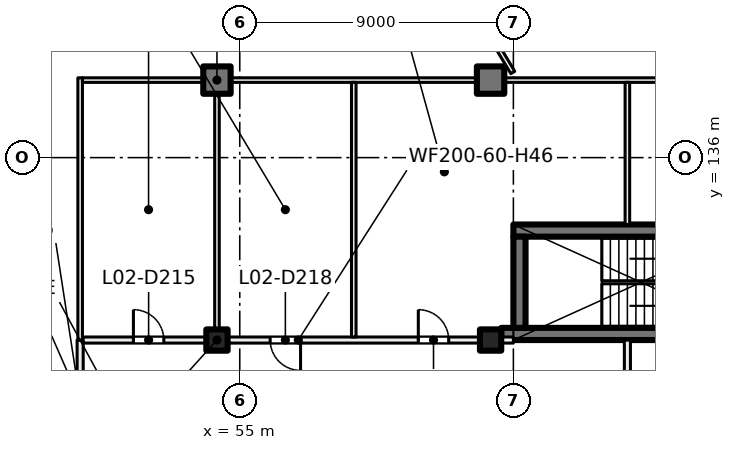
"""IFC4 building model, lengths in metres.
Left out: names, types, materials, properties, quantities, classifications, styles, units other than length and angle.
Written with IfcOpenShell. Run it as: python <this file> out.ifc"""

import sys

from ifc_helpers import new_model, si_unit, direction, frame, frame_2d, origin, origin_2d, place, context, subcontext, project, spatial, rectangle, extrude, element, fill, save


model = new_model("IFC4")
c1 = context("Model", 3, precision=1e-05, world=origin(), true_north=direction((0.0, 1.0)))
c2 = subcontext(c1, "Body", "Model", "MODEL_VIEW")
j1 = project(units=[si_unit("LENGTHUNIT", "METRE"), si_unit("PLANEANGLEUNIT", "RADIAN")], contexts=[c1])
p1 = place(None, origin())
s1 = spatial("IfcSite", under=j1, at=p1, CompositionType="ELEMENT")
p2 = place(p1, origin())
s2 = spatial("IfcBuilding", under=s1, at=p2, CompositionType="ELEMENT")
p3 = place(p2, frame((0.0, 0.0, 12.5)))
s3 = spatial("IfcBuildingStorey", under=s2, at=p3, CompositionType="ELEMENT", Elevation=12.5)
for number, where, z_axis, x_axis in (
    (1, (54.25, 130.0, 0.0), (0.0, 0.0, 1.0), (1.0, 0.0, 0.0)),
    (2, (63.25, 130.0, 0.0), (0.0, 0.0, 1.0), (1.0, 0.0, 0.0)),
):
    element("IfcColumn", number, at=place(p3, frame(where, z_axis=z_axis, x_axis=x_axis)), inside=s3, PredefinedType="COLUMN", context=c2, shape_type="SweptSolid", body=[
        extrude(rectangle(XDim=0.7, YDim=0.7, at=origin_2d()), origin(), (0.0, 0.0, 1.0), 5.0),
    ])
for number, where, z_axis, x_axis in (
    (3, (54.25, 138.55, 0.0), (0.0, 0.0, 1.0), (1.0, 0.0, 0.0)),
    (4, (63.25, 138.55, 0.0), (0.0, 0.0, 1.0), (1.0, 0.0, 0.0)),
):
    element("IfcColumn", number, at=place(p3, frame(where, z_axis=z_axis, x_axis=x_axis)), inside=s3, PredefinedType="COLUMN", context=c2, shape_type="SweptSolid", body=[
        extrude(rectangle(XDim=0.9, YDim=0.9, at=origin_2d()), origin(), (0.0, 0.0, 1.0), 5.0),
    ])
p4 = place(p3, frame((63.6, 130.2, 0.0), z_axis=(0.0, 0.0, 1.0), x_axis=(1.0, 0.0, 0.0)))
e5 = element("IfcWall", 5, at=p4, inside=s3, PredefinedType="SHEAR", context=c2, shape_type="SweptSolid", body=[
    extrude(rectangle(XDim=8.8, YDim=0.4, at=frame_2d((4.4, 0.0))), origin(), (0.0, 0.0, 1.0), 5.0),
])
p5 = place(p4, frame((7.175, 0.0, 0.0)))
e6 = element("IfcOpeningElement", 6, at=p5, cuts=e5, PredefinedType="OPENING", context=c2, shape_type="SweptSolid", body=[
    extrude(rectangle(XDim=1.0, YDim=2.1, at=frame_2d((0.5, 1.05))), frame((0.0, 0.21, 0.0), z_axis=(0.0, -1.0, 0.0), x_axis=(1.0, 0.0, 0.0)), (0.0, 0.0, 1.0), 0.42),
])
p6 = place(p3, frame((64.0, 133.6, 0.0), z_axis=(0.0, 0.0, 1.0), x_axis=(1.0, 0.0, 0.0)))
e7 = element("IfcWall", 7, at=p6, inside=s3, PredefinedType="SHEAR", context=c2, shape_type="SweptSolid", body=[
    extrude(rectangle(XDim=8.4, YDim=0.4, at=frame_2d((4.2, 0.0))), origin(), (0.0, 0.0, 1.0), 5.0),
])
p7 = place(p3, frame((64.2, 130.4, 0.0), z_axis=(0.0, 0.0, 1.0), x_axis=(0.0, 1.0, 0.0)))
e8 = element("IfcWall", 8, at=p7, inside=s3, PredefinedType="SHEAR", context=c2, shape_type="SweptSolid", body=[
    extrude(rectangle(XDim=3.0, YDim=0.4, at=frame_2d((1.5, 0.0))), origin(), (0.0, 0.0, 1.0), 5.0),
])
p8 = place(p3, frame((49.75, 126.0, 0.0), z_axis=(0.0, 0.0, 1.0), x_axis=(0.0, 1.0, 0.0)))
e9 = element("IfcWall", 9, at=p8, inside=s3, PredefinedType="PARTITIONING", context=c2, shape_type="SweptSolid", body=[
    extrude(rectangle(XDim=4.0, YDim=0.2, at=frame_2d((2.0, 0.0))), origin(), (0.0, 0.0, 1.0), 4.6),
])
p9 = place(p8, frame((1.1, 0.0, 0.0)))
e10 = element("IfcOpeningElement", 10, at=p9, cuts=e9, PredefinedType="OPENING", context=c2, shape_type="SweptSolid", body=[
    extrude(rectangle(XDim=1.8, YDim=2.1, at=frame_2d((0.9, 1.05))), frame((0.0, 0.11, 0.0), z_axis=(0.0, -1.0, 0.0), x_axis=(1.0, 0.0, 0.0)), (0.0, 0.0, 1.0), 0.22),
])
p10 = place(p3, frame((49.75, 130.0, 0.0), z_axis=(0.0, 0.0, 1.0), x_axis=(0.0, 1.0, 0.0)))
e11 = element("IfcWall", 11, at=p10, inside=s3, PredefinedType="PARTITIONING", context=c2, shape_type="SweptSolid", body=[
    extrude(rectangle(XDim=8.625, YDim=0.15, at=frame_2d((4.312, 0.0))), origin(), (0.0, 0.0, 1.0), 4.6),
])
p11 = place(p3, frame((49.85, 130.0, 0.0), z_axis=(0.0, 0.0, 1.0), x_axis=(1.0, 0.0, 0.0)))
e12 = element("IfcWall", 12, at=p11, inside=s3, PredefinedType="PARTITIONING", context=c2, shape_type="SweptSolid", body=[
    extrude(rectangle(XDim=14.15, YDim=0.2, at=frame_2d((7.075, 0.0))), origin(), (0.0, 0.0, 1.0), 4.6),
])
p12 = place(p11, frame((1.652, 0.0, 0.0)))
e13 = element("IfcOpeningElement", 13, at=p12, cuts=e12, PredefinedType="OPENING", context=c2, shape_type="SweptSolid", body=[
    extrude(rectangle(XDim=1.0, YDim=2.1, at=frame_2d((0.5, 1.05))), frame((0.0, 0.11, 0.0), z_axis=(0.0, -1.0, 0.0), x_axis=(1.0, 0.0, 0.0)), (0.0, 0.0, 1.0), 0.22),
])
p13 = place(p11, frame((6.15, 0.0, 0.0)))
e14 = element("IfcOpeningElement", 14, at=p13, cuts=e12, PredefinedType="OPENING", context=c2, shape_type="SweptSolid", body=[
    extrude(rectangle(XDim=1.0, YDim=2.1, at=frame_2d((0.5, 1.05))), frame((0.0, 0.11, 0.0), z_axis=(0.0, -1.0, 0.0), x_axis=(1.0, 0.0, 0.0)), (0.0, 0.0, 1.0), 0.22),
])
p14 = place(p11, frame((11.023, 0.0, 0.0)))
e15 = element("IfcOpeningElement", 15, at=p14, cuts=e12, PredefinedType="OPENING", context=c2, shape_type="SweptSolid", body=[
    extrude(rectangle(XDim=1.0, YDim=2.1, at=frame_2d((0.5, 1.05))), frame((0.0, 0.11, 0.0), z_axis=(0.0, -1.0, 0.0), x_axis=(1.0, 0.0, 0.0)), (0.0, 0.0, 1.0), 0.22),
])
p15 = place(p3, frame((49.825, 138.55, 0.0), z_axis=(0.0, 0.0, 1.0), x_axis=(1.0, 0.0, 0.0)))
e16 = element("IfcWall", 16, at=p15, inside=s3, PredefinedType="PARTITIONING", context=c2, shape_type="SweptSolid", body=[
    extrude(rectangle(XDim=41.175, YDim=0.15, at=frame_2d((20.587, 0.0))), origin(), (0.0, 0.0, 1.0), 4.6),
])
p16 = place(p15, frame((29.645, 0.0, 0.0)))
e17 = element("IfcOpeningElement", 17, at=p16, cuts=e16, PredefinedType="OPENING", context=c2, shape_type="SweptSolid", body=[
    extrude(rectangle(XDim=1.0, YDim=2.1, at=frame_2d((0.5, 1.05))), frame((0.0, 0.085, 0.0), z_axis=(0.0, -1.0, 0.0), x_axis=(1.0, 0.0, 0.0)), (0.0, 0.0, 1.0), 0.17),
])
p17 = place(p15, frame((37.775, 0.0, 0.0)))
e18 = element("IfcOpeningElement", 18, at=p17, cuts=e16, PredefinedType="OPENING", context=c2, shape_type="SweptSolid", body=[
    extrude(rectangle(XDim=1.8, YDim=2.1, at=frame_2d((0.9, 1.05))), frame((0.0, 0.085, 0.0), z_axis=(0.0, -1.0, 0.0), x_axis=(1.0, 0.0, 0.0)), (0.0, 0.0, 1.0), 0.17),
])
for number, where, z_axis, x_axis in (
    (19, (54.25, 130.1, 0.0), (0.0, 0.0, 1.0), (0.0, 1.0, 0.0)),
    (20, (58.75, 130.1, 0.0), (0.0, 0.0, 1.0), (0.0, 1.0, 0.0)),
):
    element("IfcWall", number, at=place(p3, frame(where, z_axis=z_axis, x_axis=x_axis)), inside=s3, PredefinedType="PARTITIONING", context=c2, shape_type="SweptSolid", body=[
        extrude(rectangle(XDim=8.375, YDim=0.15, at=frame_2d((4.188, 0.0))), origin(), (0.0, 0.0, 1.0), 4.6),
    ])
p18 = place(p3, frame((63.459, 139.67, 0.0), z_axis=(0.0, 0.0, 1.0), x_axis=(0.514106720628, -0.857726226604, 0.0)))
e21 = element("IfcWall", 21, at=p18, inside=s3, PredefinedType="PARTITIONING", context=c2, shape_type="SweptSolid", body=[
    extrude(rectangle(XDim=1.015, YDim=0.15, at=frame_2d((0.508, 0.0))), origin(), (0.0, 0.0, 1.0), 4.6),
])
p19 = place(p3, frame((67.75, 130.0, 0.0), z_axis=(0.0, 0.0, 1.0), x_axis=(0.0, -1.0, 0.0)))
e22 = element("IfcWall", 22, at=p19, inside=s3, PredefinedType="PARTITIONING", context=c2, shape_type="SweptSolid", body=[
    extrude(rectangle(XDim=4.0, YDim=0.2, at=frame_2d((2.0, 0.0))), origin(), (0.0, 0.0, 1.0), 4.6),
])
p20 = place(p19, frame((1.1, 0.0, 0.0)))
e23 = element("IfcOpeningElement", 23, at=p20, cuts=e22, PredefinedType="OPENING", context=c2, shape_type="SweptSolid", body=[
    extrude(rectangle(XDim=1.8, YDim=2.1, at=frame_2d((0.9, 1.05))), frame((0.0, 0.11, 0.0), z_axis=(0.0, -1.0, 0.0), x_axis=(1.0, 0.0, 0.0)), (0.0, 0.0, 1.0), 0.22),
])
p21 = place(p3, frame((67.75, 133.8, 0.0), z_axis=(0.0, 0.0, 1.0), x_axis=(0.0, 1.0, 0.0)))
e24 = element("IfcWall", 24, at=p21, inside=s3, PredefinedType="PARTITIONING", context=c2, shape_type="SweptSolid", body=[
    extrude(rectangle(XDim=4.675, YDim=0.15, at=frame_2d((2.337, 0.0))), origin(), (0.0, 0.0, 1.0), 4.6),
])
p22 = place(p12, origin())
e25 = element("IfcDoor", 25, at=p22, inside=s3, OperationType="SINGLE_SWING_LEFT", PredefinedType="DOOR", context=c2, shape_type="SweptSolid", body=[
    extrude(rectangle(XDim=1.0, YDim=2.1, at=frame_2d((0.5, 1.05))), frame((0.0, 0.025, 0.0), z_axis=(0.0, -1.0, 0.0), x_axis=(1.0, 0.0, 0.0)), (0.0, 0.0, 1.0), 0.05),
])
fill(e13, e25)
p23 = place(p13, origin())
e26 = element("IfcDoor", 26, at=p23, inside=s3, OperationType="SINGLE_SWING_RIGHT", PredefinedType="DOOR", context=c2, shape_type="SweptSolid", body=[
    extrude(rectangle(XDim=1.0, YDim=2.1, at=frame_2d((0.5, 1.05))), frame((0.0, 0.025, 0.0), z_axis=(0.0, -1.0, 0.0), x_axis=(1.0, 0.0, 0.0)), (0.0, 0.0, 1.0), 0.05),
])
fill(e14, e26)
p24 = place(p14, origin())
e27 = element("IfcDoor", 27, at=p24, inside=s3, OperationType="SINGLE_SWING_LEFT", PredefinedType="DOOR", context=c2, shape_type="SweptSolid", body=[
    extrude(rectangle(XDim=1.0, YDim=2.1, at=frame_2d((0.5, 1.05))), frame((0.0, 0.025, 0.0), z_axis=(0.0, -1.0, 0.0), x_axis=(1.0, 0.0, 0.0)), (0.0, 0.0, 1.0), 0.05),
])
fill(e15, e27)
save(model, sys.argv[1])
